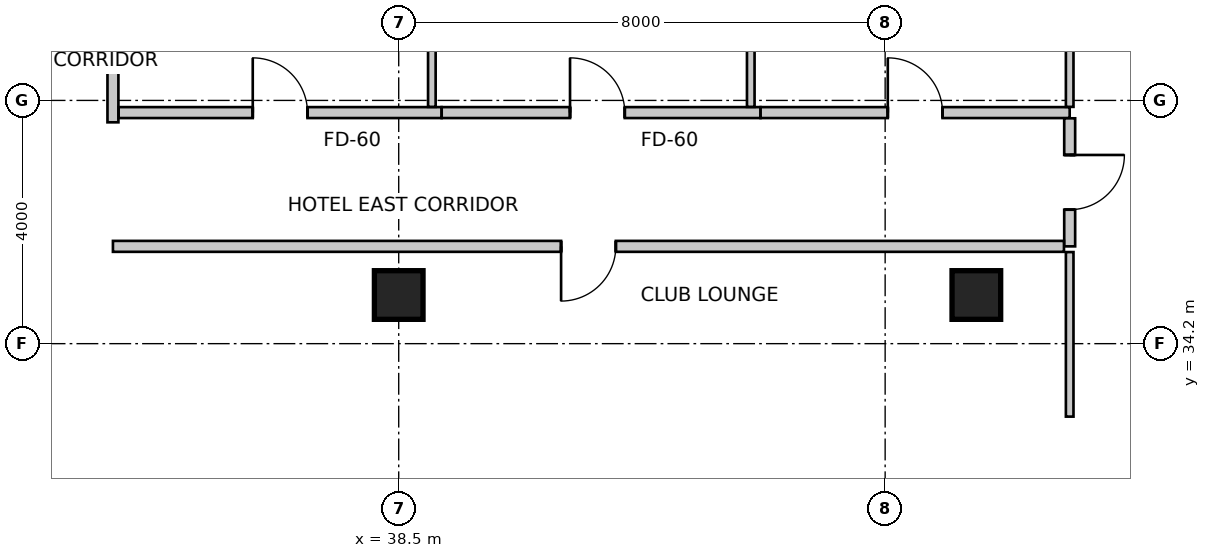
"""IFC4 building model, lengths in metres.
Left out: names, types, materials, properties, quantities, classifications, styles, units other than length and angle.
Written with IfcOpenShell. Run it as: python <this file> out.ifc"""

import sys

from ifc_helpers import new_model, si_unit, direction, frame, frame_2d, origin, origin_2d, place, context, subcontext, project, spatial, rectangle, extrude, source, transform, mapped, element, fill, save


model = new_model("IFC4")
c1 = context("Model", 3, precision=1e-05, world=origin(), true_north=direction((0.0, 1.0)))
c2 = subcontext(c1, "Body", "Model", "MODEL_VIEW")
j1 = project(units=[si_unit("LENGTHUNIT", "METRE"), si_unit("PLANEANGLEUNIT", "RADIAN")], contexts=[c1])
p1 = place(None, origin())
s1 = spatial("IfcSite", under=j1, at=p1, CompositionType="ELEMENT")
p2 = place(p1, origin())
s2 = spatial("IfcBuilding", under=s1, at=p2, CompositionType="ELEMENT")
p3 = place(p2, frame((0.0, 0.0, 117.8)))
s3 = spatial("IfcBuildingStorey", under=s2, at=p3, CompositionType="ELEMENT", Elevation=117.8)
m1 = source(origin(), c2, "Body", "SweptSolid", [
    extrude(rectangle(XDim=0.8, YDim=0.8, at=origin_2d()), origin(), (0.0, 0.0, 1.0), 3.6),
])
for number, where, z_axis, x_axis in (
    (1, (38.5, 35.0, 0.0), (0.0, 0.0, 1.0), (1.0, 0.0, 0.0)),
    (2, (48.0, 35.0, 0.0), (0.0, 0.0, 1.0), (1.0, 0.0, 0.0)),
):
    element("IfcColumn", number, at=place(p3, frame(where, z_axis=z_axis, x_axis=x_axis)), inside=s3, PredefinedType="COLUMN", context=c2, shape_type="MappedRepresentation", body=[
        mapped(m1, transform((0.0, 0.0, 0.0), scale=1.0)),
    ])
p4 = place(p3, frame((33.8, 46.256, 0.0), z_axis=(0.0, 0.0, 1.0), x_axis=(0.0, -1.0, 0.0)))
e3 = element("IfcWall", 3, at=p4, inside=s3, PredefinedType="PARTITIONING", context=c2, shape_type="SweptSolid", body=[
    extrude(rectangle(XDim=8.416, YDim=0.18, at=frame_2d((4.208, 0.0))), origin(), (0.0, 0.0, 1.0), 2.879),
])
p5 = place(p3, frame((33.894, 38.0, 0.0), z_axis=(0.0, 0.0, 1.0), x_axis=(1.0, 0.0, 0.0)))
e4 = element("IfcWall", 4, at=p5, inside=s3, PredefinedType="PARTITIONING", context=c2, shape_type="SweptSolid", body=[
    extrude(rectangle(XDim=5.311, YDim=0.18, at=frame_2d((2.656, 0.0))), origin(), (0.0, 0.0, 1.0), 2.803),
])
m2 = source(origin(), c2, "Body", "SweptSolid", [
    extrude(rectangle(XDim=0.9, YDim=2.15, at=frame_2d((0.45, 1.075))), frame((0.0, 0.1, 0.0), z_axis=(0.0, -1.0, 0.0), x_axis=(1.0, 0.0, 0.0)), (0.0, 0.0, 1.0), 0.2),
])
p6 = place(p5, frame((2.206, 0.0, 0.0)))
e5 = element("IfcOpeningElement", 5, at=p6, cuts=e4, PredefinedType="OPENING", context=c2, shape_type="MappedRepresentation", body=[
    mapped(m2, transform((0.0, 0.0, 0.0), scale=1.0)),
])
p7 = place(p3, frame((39.207, 38.0, 0.0), z_axis=(0.0, 0.0, 1.0), x_axis=(1.0, 0.0, 0.0)))
e6 = element("IfcWall", 6, at=p7, inside=s3, PredefinedType="PARTITIONING", context=c2, shape_type="SweptSolid", body=[
    extrude(rectangle(XDim=5.243, YDim=0.18, at=frame_2d((2.622, 0.0))), origin(), (0.0, 0.0, 1.0), 2.879),
])
p8 = place(p7, frame((2.111, 0.0, 0.0)))
e7 = element("IfcOpeningElement", 7, at=p8, cuts=e6, PredefinedType="OPENING", context=c2, shape_type="MappedRepresentation", body=[
    mapped(m2, transform((0.0, 0.0, 0.0), scale=1.0)),
])
p9 = place(p3, frame((44.452, 38.0, 0.0), z_axis=(0.0, 0.0, 1.0), x_axis=(1.0, 0.0, 0.0)))
e8 = element("IfcWall", 8, at=p9, inside=s3, PredefinedType="PARTITIONING", context=c2, shape_type="SweptSolid", body=[
    extrude(rectangle(XDim=5.083, YDim=0.18, at=frame_2d((2.542, 0.0))), origin(), (0.0, 0.0, 1.0), 2.803),
])
p10 = place(p9, frame((2.092, 0.0, 0.0)))
e9 = element("IfcOpeningElement", 9, at=p10, cuts=e8, PredefinedType="OPENING", context=c2, shape_type="MappedRepresentation", body=[
    mapped(m2, transform((0.0, 0.0, 0.0), scale=1.0)),
])
p11 = place(p3, frame((49.535, 37.906, 0.0), z_axis=(0.0, 0.0, 1.0), x_axis=(0.0, -1.0, 0.0)))
e10 = element("IfcWall", 10, at=p11, inside=s3, PredefinedType="PARTITIONING", context=c2, shape_type="SweptSolid", body=[
    extrude(rectangle(XDim=2.106, YDim=0.18, at=frame_2d((1.053, 0.0))), origin(), (0.0, 0.0, 1.0), 3.35),
])
p12 = place(p11, frame((0.603, 0.0, 0.0)))
e11 = element("IfcOpeningElement", 11, at=p12, cuts=e10, PredefinedType="OPENING", context=c2, shape_type="MappedRepresentation", body=[
    mapped(m2, transform((0.0, 0.0, 0.0), scale=1.0)),
])
p13 = place(p3, frame((49.441, 35.8, 0.0), z_axis=(0.0, 0.0, 1.0), x_axis=(-1.0, 0.0, 0.0)))
e12 = element("IfcWall", 12, at=p13, inside=s3, PredefinedType="PARTITIONING", context=c2, shape_type="SweptSolid", body=[
    extrude(rectangle(XDim=15.641, YDim=0.18, at=frame_2d((7.82, 0.0))), origin(), (0.0, 0.0, 1.0), 2.803),
])
p14 = place(p13, frame((7.371, 0.0, 0.0)))
e13 = element("IfcOpeningElement", 13, at=p14, cuts=e12, PredefinedType="OPENING", context=c2, shape_type="MappedRepresentation", body=[
    mapped(m2, transform((0.0, 0.0, 0.0), scale=1.0)),
])
p15 = place(p3, frame((39.045, 47.47, 0.0), z_axis=(0.0, 0.0, 1.0), x_axis=(0.0, -1.0, 0.0)))
e14 = element("IfcWall", 14, at=p15, inside=s3, PredefinedType="PARTITIONING", context=c2, shape_type="SweptSolid", body=[
    extrude(rectangle(XDim=9.376, YDim=0.125, at=frame_2d((4.688, 0.0))), origin(), (0.0, 0.0, 1.0), 2.492),
])
p16 = place(p3, frame((44.29, 46.579, 0.0), z_axis=(0.0, 0.0, 1.0), x_axis=(0.0, -1.0, 0.0)))
e15 = element("IfcWall", 15, at=p16, inside=s3, PredefinedType="PARTITIONING", context=c2, shape_type="SweptSolid", body=[
    extrude(rectangle(XDim=8.485, YDim=0.125, at=frame_2d((4.242, 0.0))), origin(), (0.0, 0.0, 1.0), 2.492),
])
p17 = place(p3, frame((49.535, 48.049, 0.0), z_axis=(0.0, 0.0, 1.0), x_axis=(0.0, -1.0, 0.0)))
e16 = element("IfcWall", 16, at=p17, inside=s3, PredefinedType="PARTITIONING", context=c2, shape_type="SweptSolid", body=[
    extrude(rectangle(XDim=9.955, YDim=0.125, at=frame_2d((4.977, 0.0))), origin(), (0.0, 0.0, 1.0), 3.35),
])
p18 = place(p3, frame((49.535, 33.0, 0.0), z_axis=(0.0, 0.0, 1.0), x_axis=(0.0, 1.0, 0.0)))
e17 = element("IfcWall", 17, at=p18, inside=s3, PredefinedType="PARTITIONING", context=c2, shape_type="SweptSolid", body=[
    extrude(rectangle(XDim=2.706, YDim=0.125, at=frame_2d((1.353, 0.0))), origin(), (0.0, 0.0, 1.0), 3.35),
])
m3 = source(origin(), c2, "Body", "SweptSolid", [
    extrude(rectangle(XDim=0.9, YDim=2.15, at=frame_2d((0.45, 1.075))), frame((0.0, 0.025, 0.0), z_axis=(0.0, -1.0, 0.0), x_axis=(1.0, 0.0, 0.0)), (0.0, 0.0, 1.0), 0.05),
])
p19 = place(p6, origin())
e18 = element("IfcDoor", 18, at=p19, inside=s3, OperationType="SINGLE_SWING_LEFT", PredefinedType="DOOR", context=c2, shape_type="MappedRepresentation", body=[
    mapped(m3, transform((0.0, 0.0, 0.0), scale=1.0)),
])
fill(e5, e18)
p20 = place(p8, origin())
e19 = element("IfcDoor", 19, at=p20, inside=s3, OperationType="SINGLE_SWING_LEFT", PredefinedType="DOOR", context=c2, shape_type="MappedRepresentation", body=[
    mapped(m3, transform((0.0, 0.0, 0.0), scale=1.0)),
])
fill(e7, e19)
p21 = place(p10, origin())
e20 = element("IfcDoor", 20, at=p21, inside=s3, OperationType="SINGLE_SWING_LEFT", PredefinedType="DOOR", context=c2, shape_type="MappedRepresentation", body=[
    mapped(m3, transform((0.0, 0.0, 0.0), scale=1.0)),
])
fill(e9, e20)
p22 = place(p12, origin())
e21 = element("IfcDoor", 21, at=p22, inside=s3, OperationType="SINGLE_SWING_LEFT", PredefinedType="DOOR", context=c2, shape_type="MappedRepresentation", body=[
    mapped(m3, transform((0.0, 0.0, 0.0), scale=1.0)),
])
fill(e11, e21)
m4 = source(origin(), c2, "Body", "SweptSolid", [
    extrude(rectangle(XDim=0.9, YDim=2.15, at=frame_2d((0.45, 1.075))), frame((0.0, 0.025, 0.0), z_axis=(0.0, -1.0, 0.0), x_axis=(1.0, 0.0, 0.0)), (0.0, 0.0, 1.0), 0.05),
])
p23 = place(p14, origin())
e22 = element("IfcDoor", 22, at=p23, inside=s3, OperationType="SINGLE_SWING_RIGHT", PredefinedType="DOOR", context=c2, shape_type="MappedRepresentation", body=[
    mapped(m4, transform((0.0, 0.0, 0.0), scale=1.0)),
])
fill(e13, e22)
save(model, sys.argv[1])
